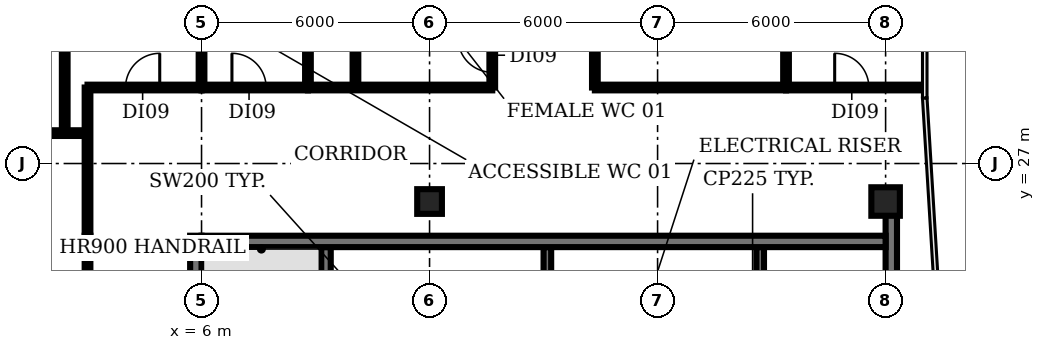
"""IFC4 building model, lengths in metres.
Left out: names, types, materials, properties, quantities, classifications, styles, units other than length and angle.
Written with IfcOpenShell. Run it as: python <this file> out.ifc"""

import sys

from ifc_helpers import new_model, si_unit, direction, frame, frame_2d, origin, origin_2d, place, context, subcontext, project, spatial, rectangle, extrude, element, fill, save


model = new_model("IFC4")
c1 = context("Model", 3, precision=1e-05, world=origin(), true_north=direction((0.0, 1.0)))
c2 = subcontext(c1, "Body", "Model", "MODEL_VIEW")
j1 = project(units=[si_unit("LENGTHUNIT", "METRE"), si_unit("PLANEANGLEUNIT", "RADIAN")], contexts=[c1])
p1 = place(None, origin())
s1 = spatial("IfcSite", under=j1, at=p1, CompositionType="ELEMENT")
p2 = place(p1, origin())
s2 = spatial("IfcBuilding", under=s1, at=p2, CompositionType="ELEMENT")
p3 = place(p2, frame((0.0, 0.0, 302.0)))
s3 = spatial("IfcBuildingStorey", under=s2, at=p3, CompositionType="ELEMENT", Elevation=302.0)
p4 = place(p3, frame((12.0, 26.0, 0.0), z_axis=(0.0, 0.0, 1.0), x_axis=(1.0, 0.0, 0.0)))
e1 = element("IfcColumn", 1, at=p4, inside=s3, PredefinedType="COLUMN", context=c2, shape_type="SweptSolid", body=[
    extrude(rectangle(XDim=0.65, YDim=0.65, at=origin_2d()), origin(), (0.0, 0.0, 1.0), 3.85),
])
p5 = place(p3, frame((24.0, 26.0, 0.0), z_axis=(0.0, 0.0, 1.0), x_axis=(1.0, 0.0, 0.0)))
e2 = element("IfcColumn", 2, at=p5, inside=s3, PredefinedType="COLUMN", context=c2, shape_type="SweptSolid", body=[
    extrude(rectangle(XDim=0.75, YDim=0.75, at=origin_2d()), origin(), (0.0, 0.0, 1.0), 3.85),
])
p6 = place(p3, frame((9.275, 18.375, 0.0), z_axis=(0.0, 0.0, 1.0), x_axis=(0.0, 1.0, 0.0)))
e3 = element("IfcWall", 3, at=p6, inside=s3, PredefinedType="SHEAR", context=c2, shape_type="SweptSolid", body=[
    extrude(rectangle(XDim=6.425, YDim=0.25, at=frame_2d((3.212, 0.0))), origin(), (0.0, 0.0, 1.0), 3.85),
])
for number, where, z_axis, x_axis in (
    (4, (15.1, 22.9, 0.0), (0.0, 0.0, 1.0), (0.0, 1.0, 0.0)),
    (5, (20.7, 22.9, 0.0), (0.0, 0.0, 1.0), (0.0, 1.0, 0.0)),
):
    element("IfcWall", number, at=place(p3, frame(where, z_axis=z_axis, x_axis=x_axis)), inside=s3, PredefinedType="SHEAR", context=c2, shape_type="SweptSolid", body=[
        extrude(rectangle(XDim=1.9, YDim=0.2, at=frame_2d((0.95, 0.0))), origin(), (0.0, 0.0, 1.0), 3.85),
    ])
p7 = place(p3, frame((5.85, 5.1, 0.0), z_axis=(0.0, 0.0, 1.0), x_axis=(0.0, 1.0, 0.0)))
e6 = element("IfcWall", 6, at=p7, inside=s3, PredefinedType="SHEAR", context=c2, shape_type="SweptSolid", body=[
    extrude(rectangle(XDim=20.0, YDim=0.3, at=frame_2d((10.0, 0.0))), origin(), (0.0, 0.0, 1.0), 3.85),
])
p8 = place(p7, frame((0.55, 0.0, 0.0)))
e7 = element("IfcOpeningElement", 7, at=p8, cuts=e6, PredefinedType="OPENING", context=c2, shape_type="SweptSolid", body=[
    extrude(rectangle(XDim=1.5, YDim=2.1, at=frame_2d((0.75, 1.05))), frame((0.0, 0.16, 0.0), z_axis=(0.0, -1.0, 0.0), x_axis=(1.0, 0.0, 0.0)), (0.0, 0.0, 1.0), 0.32),
])
p9 = place(p7, frame((7.0, 0.0, 0.0)))
e8 = element("IfcOpeningElement", 8, at=p9, cuts=e6, PredefinedType="OPENING", context=c2, shape_type="SweptSolid", body=[
    extrude(rectangle(XDim=1.2, YDim=2.1, at=frame_2d((0.6, 1.05))), frame((0.0, 0.16, 0.0), z_axis=(0.0, -1.0, 0.0), x_axis=(1.0, 0.0, 0.0)), (0.0, 0.0, 1.0), 0.32),
])
p10 = place(p7, frame((13.55, 0.0, 0.0)))
e9 = element("IfcOpeningElement", 9, at=p10, cuts=e6, PredefinedType="OPENING", context=c2, shape_type="SweptSolid", body=[
    extrude(rectangle(XDim=1.2, YDim=2.1, at=frame_2d((0.6, 1.05))), frame((0.0, 0.16, 0.0), z_axis=(0.0, -1.0, 0.0), x_axis=(1.0, 0.0, 0.0)), (0.0, 0.0, 1.0), 0.32),
])
p11 = place(p3, frame((24.15, 25.655, 0.0), z_axis=(0.0, 0.0, 1.0), x_axis=(0.0, -1.0, 0.0)))
e10 = element("IfcWall", 10, at=p11, inside=s3, PredefinedType="SHEAR", context=c2, shape_type="SweptSolid", body=[
    extrude(rectangle(XDim=20.555, YDim=0.3, at=frame_2d((10.277, 0.0))), origin(), (0.0, 0.0, 1.0), 3.85),
])
p12 = place(p11, frame((18.505, 0.0, 0.0)))
e11 = element("IfcOpeningElement", 11, at=p12, cuts=e10, PredefinedType="OPENING", context=c2, shape_type="SweptSolid", body=[
    extrude(rectangle(XDim=1.5, YDim=2.1, at=frame_2d((0.75, 1.05))), frame((0.0, 0.16, 0.0), z_axis=(0.0, -1.0, 0.0), x_axis=(1.0, 0.0, 0.0)), (0.0, 0.0, 1.0), 0.32),
])
p13 = place(p11, frame((12.405, 0.0, 0.0)))
e12 = element("IfcOpeningElement", 12, at=p13, cuts=e10, PredefinedType="OPENING", context=c2, shape_type="SweptSolid", body=[
    extrude(rectangle(XDim=0.9, YDim=2.1, at=frame_2d((0.45, 1.05))), frame((0.0, 0.16, 0.0), z_axis=(0.0, -1.0, 0.0), x_axis=(1.0, 0.0, 0.0)), (0.0, 0.0, 1.0), 0.32),
])
p14 = place(p11, frame((6.405, 0.0, 0.0)))
e13 = element("IfcOpeningElement", 13, at=p14, cuts=e10, PredefinedType="OPENING", context=c2, shape_type="SweptSolid", body=[
    extrude(rectangle(XDim=2.0, YDim=2.1, at=frame_2d((1.0, 1.05))), frame((0.0, 0.16, 0.0), z_axis=(0.0, -1.0, 0.0), x_axis=(1.0, 0.0, 0.0)), (0.0, 0.0, 1.0), 0.32),
])
p15 = place(p3, frame((6.0, 24.95, 0.0), z_axis=(0.0, 0.0, 1.0), x_axis=(1.0, 0.0, 0.0)))
e14 = element("IfcWall", 14, at=p15, inside=s3, PredefinedType="SHEAR", context=c2, shape_type="SweptSolid", body=[
    extrude(rectangle(XDim=18.0, YDim=0.3, at=frame_2d((9.0, 0.0))), origin(), (0.0, 0.0, 1.0), 3.85),
])
p16 = place(p3, frame((-0.98, 27.8, 0.0), z_axis=(0.0, 0.0, 1.0), x_axis=(1.0, 0.0, 0.0)))
e15 = element("IfcWall", 15, at=p16, inside=s3, PredefinedType="PARTITIONING", context=c2, shape_type="SweptSolid", body=[
    extrude(rectangle(XDim=3.98, YDim=0.15, at=frame_2d((1.99, 0.0))), origin(), (0.0, 0.0, 1.0), 2.9),
])
p17 = place(p3, frame((2.4, 27.8, 0.0), z_axis=(0.0, 0.0, 1.0), x_axis=(0.0, 1.0, 0.0)))
e16 = element("IfcWall", 16, at=p17, inside=s3, PredefinedType="PARTITIONING", context=c2, shape_type="SweptSolid", body=[
    extrude(rectangle(XDim=6.0, YDim=0.15, at=frame_2d((3.0, 0.0))), origin(), (0.0, 0.0, 1.0), 2.9),
])
p18 = place(p3, frame((3.0, 5.1, 0.0), z_axis=(0.0, 0.0, 1.0), x_axis=(0.0, 1.0, 0.0)))
e17 = element("IfcWall", 17, at=p18, inside=s3, PredefinedType="PARTITIONING", context=c2, shape_type="SweptSolid", body=[
    extrude(rectangle(XDim=20.0, YDim=0.15, at=frame_2d((10.0, 0.0))), origin(), (0.0, 0.0, 1.0), 2.9),
])
p19 = place(p18, frame((9.3, 0.0, 0.0)))
e18 = element("IfcOpeningElement", 18, at=p19, cuts=e17, PredefinedType="OPENING", context=c2, shape_type="SweptSolid", body=[
    extrude(rectangle(XDim=1.2, YDim=2.1, at=frame_2d((0.6, 1.05))), frame((0.0, 0.085, 0.0), z_axis=(0.0, -1.0, 0.0), x_axis=(1.0, 0.0, 0.0)), (0.0, 0.0, 1.0), 0.17),
])
p20 = place(p3, frame((3.0, 25.1, 0.0), z_axis=(0.0, 0.0, 1.0), x_axis=(0.0, 1.0, 0.0)))
e19 = element("IfcWall", 19, at=p20, inside=s3, PredefinedType="PARTITIONING", context=c2, shape_type="SweptSolid", body=[
    extrude(rectangle(XDim=3.9, YDim=0.15, at=frame_2d((1.95, 0.0))), origin(), (0.0, 0.0, 1.0), 2.9),
])
p21 = place(p3, frame((3.0, 29.0, 0.0), z_axis=(0.0, 0.0, 1.0), x_axis=(1.0, 0.0, 0.0)))
e20 = element("IfcWall", 20, at=p21, inside=s3, PredefinedType="PARTITIONING", context=c2, shape_type="SweptSolid", body=[
    extrude(rectangle(XDim=3.0, YDim=0.15, at=frame_2d((1.5, 0.0))), origin(), (0.0, 0.0, 1.0), 2.9),
])
p22 = place(p21, frame((1.0, 0.0, 0.0)))
e21 = element("IfcOpeningElement", 21, at=p22, cuts=e20, PredefinedType="OPENING", context=c2, shape_type="SweptSolid", body=[
    extrude(rectangle(XDim=0.9, YDim=2.1, at=frame_2d((0.45, 1.05))), frame((0.0, 0.085, 0.0), z_axis=(0.0, -1.0, 0.0), x_axis=(1.0, 0.0, 0.0)), (0.0, 0.0, 1.0), 0.17),
])
p23 = place(p3, frame((6.0, 29.0, 0.0), z_axis=(0.0, 0.0, 1.0), x_axis=(0.0, 1.0, 0.0)))
e22 = element("IfcWall", 22, at=p23, inside=s3, PredefinedType="PARTITIONING", context=c2, shape_type="SweptSolid", body=[
    extrude(rectangle(XDim=4.8, YDim=0.15, at=frame_2d((2.4, 0.0))), origin(), (0.0, 0.0, 1.0), 2.9),
])
p24 = place(p3, frame((6.0, 29.0, 0.0), z_axis=(0.0, 0.0, 1.0), x_axis=(1.0, 0.0, 0.0)))
e23 = element("IfcWall", 23, at=p24, inside=s3, PredefinedType="PARTITIONING", context=c2, shape_type="SweptSolid", body=[
    extrude(rectangle(XDim=2.8, YDim=0.15, at=frame_2d((1.4, 0.0))), origin(), (0.0, 0.0, 1.0), 2.9),
])
p25 = place(p24, frame((0.8, 0.0, 0.0)))
e24 = element("IfcOpeningElement", 24, at=p25, cuts=e23, PredefinedType="OPENING", context=c2, shape_type="SweptSolid", body=[
    extrude(rectangle(XDim=0.9, YDim=2.1, at=frame_2d((0.45, 1.05))), frame((0.0, 0.085, 0.0), z_axis=(0.0, -1.0, 0.0), x_axis=(1.0, 0.0, 0.0)), (0.0, 0.0, 1.0), 0.17),
])
p26 = place(p3, frame((8.8, 29.0, 0.0), z_axis=(0.0, 0.0, 1.0), x_axis=(0.0, 1.0, 0.0)))
e25 = element("IfcWall", 25, at=p26, inside=s3, PredefinedType="PARTITIONING", context=c2, shape_type="SweptSolid", body=[
    extrude(rectangle(XDim=4.8, YDim=0.15, at=frame_2d((2.4, 0.0))), origin(), (0.0, 0.0, 1.0), 2.9),
])
p27 = place(p3, frame((8.8, 29.0, 0.0), z_axis=(0.0, 0.0, 1.0), x_axis=(1.0, 0.0, 0.0)))
e26 = element("IfcWall", 26, at=p27, inside=s3, PredefinedType="PARTITIONING", context=c2, shape_type="SweptSolid", body=[
    extrude(rectangle(XDim=4.85, YDim=0.15, at=frame_2d((2.425, 0.0))), origin(), (0.0, 0.0, 1.0), 2.9),
])
p28 = place(p3, frame((10.05, 29.0, 0.0), z_axis=(0.0, 0.0, 1.0), x_axis=(0.0, 1.0, 0.0)))
e27 = element("IfcWall", 27, at=p28, inside=s3, PredefinedType="PARTITIONING", context=c2, shape_type="SweptSolid", body=[
    extrude(rectangle(XDim=4.8, YDim=0.15, at=frame_2d((2.4, 0.0))), origin(), (0.0, 0.0, 1.0), 2.9),
])
p29 = place(p3, frame((13.65, 29.0, 0.0), z_axis=(0.0, 0.0, 1.0), x_axis=(0.0, 1.0, 0.0)))
e28 = element("IfcWall", 28, at=p29, inside=s3, PredefinedType="PARTITIONING", context=c2, shape_type="SweptSolid", body=[
    extrude(rectangle(XDim=4.8, YDim=0.15, at=frame_2d((2.4, 0.0))), origin(), (0.0, 0.0, 1.0), 2.9),
])
p30 = place(p29, frame((0.4, 0.0, 0.0)))
e29 = element("IfcOpeningElement", 29, at=p30, cuts=e28, PredefinedType="OPENING", context=c2, shape_type="SweptSolid", body=[
    extrude(rectangle(XDim=0.9, YDim=2.1, at=frame_2d((0.45, 1.05))), frame((0.0, 0.085, 0.0), z_axis=(0.0, -1.0, 0.0), x_axis=(1.0, 0.0, 0.0)), (0.0, 0.0, 1.0), 0.17),
])
p31 = place(p3, frame((16.35, 29.0, 0.0), z_axis=(0.0, 0.0, 1.0), x_axis=(0.0, 1.0, 0.0)))
e30 = element("IfcWall", 30, at=p31, inside=s3, PredefinedType="PARTITIONING", context=c2, shape_type="SweptSolid", body=[
    extrude(rectangle(XDim=4.8, YDim=0.15, at=frame_2d((2.4, 0.0))), origin(), (0.0, 0.0, 1.0), 2.9),
])
p32 = place(p3, frame((16.35, 29.0, 0.0), z_axis=(0.0, 0.0, 1.0), x_axis=(1.0, 0.0, 0.0)))
e31 = element("IfcWall", 31, at=p32, inside=s3, PredefinedType="PARTITIONING", context=c2, shape_type="SweptSolid", body=[
    extrude(rectangle(XDim=5.03, YDim=0.15, at=frame_2d((2.515, 0.0))), origin(), (0.0, 0.0, 1.0), 2.9),
])
p33 = place(p3, frame((21.38, 29.0, 0.0), z_axis=(0.0, 0.0, 1.0), x_axis=(0.0, 1.0, 0.0)))
e32 = element("IfcWall", 32, at=p33, inside=s3, PredefinedType="PARTITIONING", context=c2, shape_type="SweptSolid", body=[
    extrude(rectangle(XDim=4.8, YDim=0.15, at=frame_2d((2.4, 0.0))), origin(), (0.0, 0.0, 1.0), 2.9),
])
p34 = place(p3, frame((21.38, 29.0, 0.0), z_axis=(0.0, 0.0, 1.0), x_axis=(1.0, 0.0, 0.0)))
e33 = element("IfcWall", 33, at=p34, inside=s3, PredefinedType="PARTITIONING", context=c2, shape_type="SweptSolid", body=[
    extrude(rectangle(XDim=3.58, YDim=0.15, at=frame_2d((1.79, 0.0))), origin(), (0.0, 0.0, 1.0), 2.9),
])
p35 = place(p34, frame((1.28, 0.0, 0.0)))
e34 = element("IfcOpeningElement", 34, at=p35, cuts=e33, PredefinedType="OPENING", context=c2, shape_type="SweptSolid", body=[
    extrude(rectangle(XDim=0.9, YDim=2.1, at=frame_2d((0.45, 1.05))), frame((0.0, 0.085, 0.0), z_axis=(0.0, -1.0, 0.0), x_axis=(1.0, 0.0, 0.0)), (0.0, 0.0, 1.0), 0.17),
])
p36 = place(p22, origin())
e35 = element("IfcDoor", 35, at=p36, inside=s3, OperationType="SINGLE_SWING_RIGHT", PredefinedType="DOOR", context=c2, shape_type="SweptSolid", body=[
    extrude(rectangle(XDim=0.9, YDim=2.1, at=frame_2d((0.45, 1.05))), frame((0.0, 0.025, 0.0), z_axis=(0.0, -1.0, 0.0), x_axis=(1.0, 0.0, 0.0)), (0.0, 0.0, 1.0), 0.05),
])
fill(e21, e35)
p37 = place(p25, origin())
e36 = element("IfcDoor", 36, at=p37, inside=s3, OperationType="SINGLE_SWING_LEFT", PredefinedType="DOOR", context=c2, shape_type="SweptSolid", body=[
    extrude(rectangle(XDim=0.9, YDim=2.1, at=frame_2d((0.45, 1.05))), frame((0.0, 0.025, 0.0), z_axis=(0.0, -1.0, 0.0), x_axis=(1.0, 0.0, 0.0)), (0.0, 0.0, 1.0), 0.05),
])
fill(e24, e36)
p38 = place(p30, origin())
e37 = element("IfcDoor", 37, at=p38, inside=s3, OperationType="SINGLE_SWING_RIGHT", PredefinedType="DOOR", context=c2, shape_type="SweptSolid", body=[
    extrude(rectangle(XDim=0.9, YDim=2.1, at=frame_2d((0.45, 1.05))), frame((0.0, 0.025, 0.0), z_axis=(0.0, -1.0, 0.0), x_axis=(1.0, 0.0, 0.0)), (0.0, 0.0, 1.0), 0.05),
])
fill(e29, e37)
p39 = place(p35, origin())
e38 = element("IfcDoor", 38, at=p39, inside=s3, OperationType="SINGLE_SWING_LEFT", PredefinedType="DOOR", context=c2, shape_type="SweptSolid", body=[
    extrude(rectangle(XDim=0.9, YDim=2.1, at=frame_2d((0.45, 1.05))), frame((0.0, 0.025, 0.0), z_axis=(0.0, -1.0, 0.0), x_axis=(1.0, 0.0, 0.0)), (0.0, 0.0, 1.0), 0.05),
])
fill(e34, e38)
save(model, sys.argv[1])
